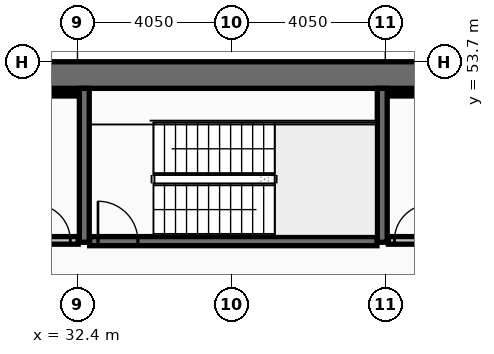
"""IFC4 building model, lengths in metres.
Left out: names, types, materials, properties, quantities, classifications, styles, units other than length and angle.
Written with IfcOpenShell. Run it as: python <this file> out.ifc"""

import sys

from ifc_helpers import new_model, si_unit, direction, frame, frame_2d, origin, place, context, subcontext, project, spatial, rectangle, extrude, element, fill, save


model = new_model("IFC4")
c1 = context("Model", 3, precision=1e-05, world=origin(), true_north=direction((0.0, 1.0)))
c2 = subcontext(c1, "Body", "Model", "MODEL_VIEW")
j1 = project(units=[si_unit("LENGTHUNIT", "METRE"), si_unit("PLANEANGLEUNIT", "RADIAN")], contexts=[c1])
p1 = place(None, origin())
s1 = spatial("IfcSite", under=j1, at=p1, CompositionType="ELEMENT")
p2 = place(p1, origin())
s2 = spatial("IfcBuilding", under=s1, at=p2, CompositionType="ELEMENT")
p3 = place(p2, frame((0.0, 0.0, 102.6)))
s3 = spatial("IfcBuildingStorey", under=s2, at=p3, CompositionType="ELEMENT", Elevation=102.6)
p4 = place(p3, frame((16.2, 53.35, 0.0), z_axis=(0.0, 0.0, 1.0), x_axis=(1.0, 0.0, 0.0)))
e1 = element("IfcWall", 1, at=p4, inside=s3, PredefinedType="SHEAR", context=c2, shape_type="SweptSolid", body=[
    extrude(rectangle(XDim=40.5, YDim=0.7, at=frame_2d((20.25, 0.0))), origin(), (0.0, 0.0, 1.0), 3.8),
])
for number, where, z_axis, x_axis in (
    (2, (32.58, 48.95, 0.0), (0.0, 0.0, 1.0), (0.0, 1.0, 0.0)),
    (3, (40.42, 48.95, 0.0), (0.0, 0.0, 1.0), (0.0, 1.0, 0.0)),
):
    element("IfcWall", number, at=place(p3, frame(where, z_axis=z_axis, x_axis=x_axis)), inside=s3, PredefinedType="SHEAR", context=c2, shape_type="SweptSolid", body=[
        extrude(rectangle(XDim=4.05, YDim=0.26, at=frame_2d((2.025, 0.0))), origin(), (0.0, 0.0, 1.0), 3.8),
    ])
p5 = place(p3, frame((32.72, 48.98, 0.0), z_axis=(0.0, 0.0, 1.0), x_axis=(1.0, 0.0, 0.0)))
e4 = element("IfcWall", 4, at=p5, inside=s3, PredefinedType="SHEAR", context=c2, shape_type="SweptSolid", body=[
    extrude(rectangle(XDim=7.56, YDim=0.24, at=frame_2d((3.78, 0.0))), origin(), (0.0, 0.0, 1.0), 3.8),
])
p6 = place(p5, frame((0.22, 0.0, 0.0)))
e5 = element("IfcOpeningElement", 5, at=p6, cuts=e4, PredefinedType="OPENING", context=c2, shape_type="SweptSolid", body=[
    extrude(rectangle(XDim=1.05, YDim=2.15, at=frame_2d((0.525, 1.075))), frame((0.0, 0.13, 0.0), z_axis=(0.0, -1.0, 0.0), x_axis=(1.0, 0.0, 0.0)), (0.0, 0.0, 1.0), 0.26),
])
p7 = place(p3, frame((24.7, 52.86, 0.0), z_axis=(0.0, 0.0, 1.0), x_axis=(1.0, 0.0, 0.0)))
e6 = element("IfcWall", 6, at=p7, inside=s3, PredefinedType="PARTITIONING", context=c2, shape_type="SweptSolid", body=[
    extrude(rectangle(XDim=7.72, YDim=0.12, at=frame_2d((3.86, 0.0))), origin(), (0.0, 0.0, 1.0), 3.8),
])
p8 = place(p3, frame((24.7, 49.0, 0.0), z_axis=(0.0, 0.0, 1.0), x_axis=(1.0, 0.0, 0.0)))
e7 = element("IfcWall", 7, at=p8, inside=s3, PredefinedType="PARTITIONING", context=c2, shape_type="SweptSolid", body=[
    extrude(rectangle(XDim=7.72, YDim=0.2, at=frame_2d((3.86, 0.0))), origin(), (0.0, 0.0, 1.0), 3.8),
])
p9 = place(p8, frame((6.56, 0.0, 0.0)))
e8 = element("IfcOpeningElement", 8, at=p9, cuts=e7, PredefinedType="OPENING", context=c2, shape_type="SweptSolid", body=[
    extrude(rectangle(XDim=0.95, YDim=2.1, at=frame_2d((0.475, 1.05))), frame((0.0, 0.11, 0.0), z_axis=(0.0, -1.0, 0.0), x_axis=(1.0, 0.0, 0.0)), (0.0, 0.0, 1.0), 0.22),
])
p10 = place(p3, frame((40.58, 52.86, 0.0), z_axis=(0.0, 0.0, 1.0), x_axis=(1.0, 0.0, 0.0)))
e9 = element("IfcWall", 9, at=p10, inside=s3, PredefinedType="PARTITIONING", context=c2, shape_type="SweptSolid", body=[
    extrude(rectangle(XDim=7.56, YDim=0.12, at=frame_2d((3.78, 0.0))), origin(), (0.0, 0.0, 1.0), 3.8),
])
p11 = place(p3, frame((40.58, 49.0, 0.0), z_axis=(0.0, 0.0, 1.0), x_axis=(1.0, 0.0, 0.0)))
e10 = element("IfcWall", 10, at=p11, inside=s3, PredefinedType="PARTITIONING", context=c2, shape_type="SweptSolid", body=[
    extrude(rectangle(XDim=7.56, YDim=0.2, at=frame_2d((3.78, 0.0))), origin(), (0.0, 0.0, 1.0), 3.8),
])
p12 = place(p11, frame((0.16, 0.0, 0.0)))
e11 = element("IfcOpeningElement", 11, at=p12, cuts=e10, PredefinedType="OPENING", context=c2, shape_type="SweptSolid", body=[
    extrude(rectangle(XDim=0.95, YDim=2.1, at=frame_2d((0.475, 1.05))), frame((0.0, 0.11, 0.0), z_axis=(0.0, -1.0, 0.0), x_axis=(1.0, 0.0, 0.0)), (0.0, 0.0, 1.0), 0.22),
])
p13 = place(p6, origin())
e12 = element("IfcDoor", 12, at=p13, inside=s3, OperationType="SINGLE_SWING_LEFT", PredefinedType="DOOR", context=c2, shape_type="SweptSolid", body=[
    extrude(rectangle(XDim=1.05, YDim=2.15, at=frame_2d((0.525, 1.075))), frame((0.0, 0.025, 0.0), z_axis=(0.0, -1.0, 0.0), x_axis=(1.0, 0.0, 0.0)), (0.0, 0.0, 1.0), 0.05),
])
fill(e5, e12)
p14 = place(p9, origin())
e13 = element("IfcDoor", 13, at=p14, inside=s3, OperationType="SINGLE_SWING_LEFT", PredefinedType="DOOR", context=c2, shape_type="SweptSolid", body=[
    extrude(rectangle(XDim=0.95, YDim=2.1, at=frame_2d((0.475, 1.05))), frame((0.0, 0.025, 0.0), z_axis=(0.0, -1.0, 0.0), x_axis=(1.0, 0.0, 0.0)), (0.0, 0.0, 1.0), 0.05),
])
fill(e8, e13)
p15 = place(p12, origin())
e14 = element("IfcDoor", 14, at=p15, inside=s3, OperationType="SINGLE_SWING_RIGHT", PredefinedType="DOOR", context=c2, shape_type="SweptSolid", body=[
    extrude(rectangle(XDim=0.95, YDim=2.1, at=frame_2d((0.475, 1.05))), frame((0.0, 0.025, 0.0), z_axis=(0.0, -1.0, 0.0), x_axis=(1.0, 0.0, 0.0)), (0.0, 0.0, 1.0), 0.05),
])
fill(e11, e14)
save(model, sys.argv[1])
